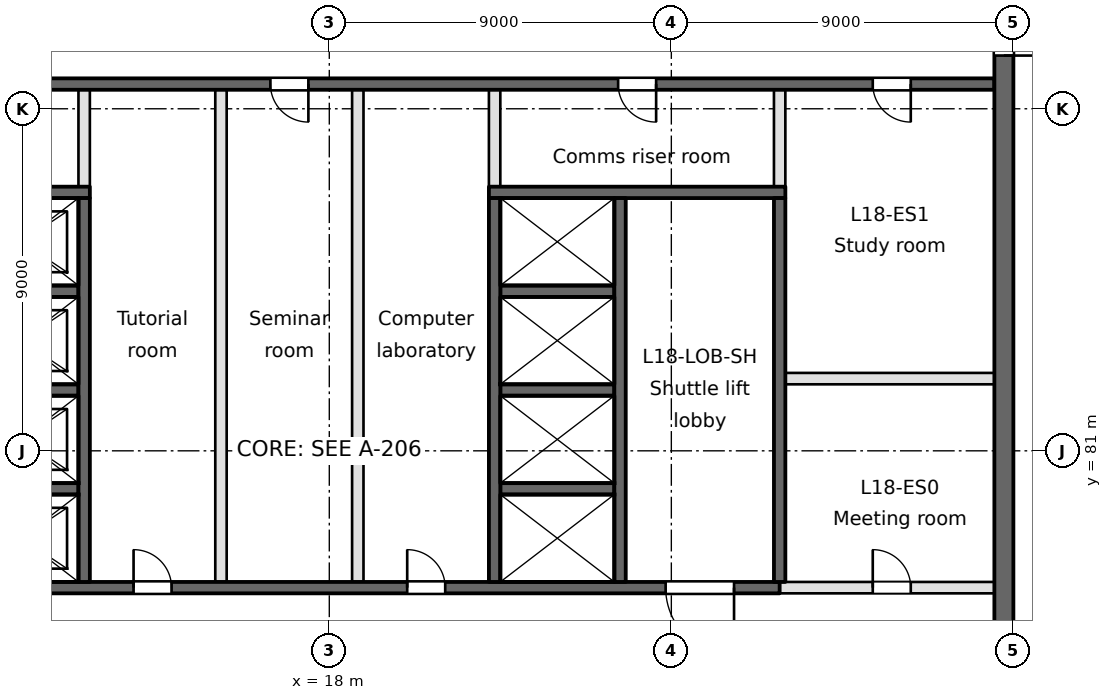
"""IFC4 building model, lengths in metres.
Left out: names, types, materials, properties, quantities, classifications, styles, units other than length and angle.
Written with IfcOpenShell. Run it as: python <this file> out.ifc"""

import sys

from ifc_helpers import new_model, si_unit, direction, frame, frame_2d, origin, place, context, subcontext, project, spatial, rectangle, extrude, element, fill, save


model = new_model("IFC4")
c1 = context("Model", 3, precision=1e-05, world=origin(), true_north=direction((0.0, 1.0)))
c2 = subcontext(c1, "Body", "Model", "MODEL_VIEW")
j1 = project(units=[si_unit("LENGTHUNIT", "METRE"), si_unit("PLANEANGLEUNIT", "RADIAN")], contexts=[c1])
p1 = place(None, origin())
s1 = spatial("IfcSite", under=j1, at=p1, CompositionType="ELEMENT")
p2 = place(p1, origin())
s2 = spatial("IfcBuilding", under=s1, at=p2, CompositionType="ELEMENT")
p3 = place(p2, frame((0.0, 0.0, 76.5)))
s3 = spatial("IfcBuildingStorey", under=s2, at=p3, CompositionType="ELEMENT", Elevation=76.5)
p4 = place(p3, frame((0.9, 77.4, -0.4), z_axis=(0.0, 0.0, 1.0), x_axis=(1.0, 0.0, 0.0)))
e1 = element("IfcWall", 1, at=p4, inside=s3, PredefinedType="SOLIDWALL", context=c2, shape_type="SweptSolid", body=[
    extrude(rectangle(XDim=28.95, YDim=0.3, at=frame_2d((14.475, 0.0))), origin(), (0.0, 0.0, 1.0), 3.65),
])
p5 = place(p4, frame((4.35, 0.0, 0.4)))
e2 = element("IfcOpeningElement", 2, at=p5, cuts=e1, PredefinedType="OPENING", context=c2, shape_type="SweptSolid", body=[
    extrude(rectangle(XDim=1.8, YDim=2.1, at=frame_2d((0.9, 1.05))), frame((0.0, 0.15, 0.0), z_axis=(0.0, -1.0, 0.0), x_axis=(1.0, 0.0, 0.0)), (0.0, 0.0, 1.0), 0.3),
])
p6 = place(p4, frame((25.95, 0.0, 0.4)))
e3 = element("IfcOpeningElement", 3, at=p6, cuts=e1, PredefinedType="OPENING", context=c2, shape_type="SweptSolid", body=[
    extrude(rectangle(XDim=1.8, YDim=2.1, at=frame_2d((0.9, 1.05))), frame((0.0, 0.15, 0.0), z_axis=(0.0, -1.0, 0.0), x_axis=(1.0, 0.0, 0.0)), (0.0, 0.0, 1.0), 0.3),
])
p7 = place(p4, frame((11.95, 0.0, 0.4)))
e4 = element("IfcOpeningElement", 4, at=p7, cuts=e1, PredefinedType="OPENING", context=c2, shape_type="SweptSolid", body=[
    extrude(rectangle(XDim=1.0, YDim=2.1, at=frame_2d((0.5, 1.05))), frame((0.0, 0.15, 0.0), z_axis=(0.0, -1.0, 0.0), x_axis=(1.0, 0.0, 0.0)), (0.0, 0.0, 1.0), 0.3),
])
p8 = place(p4, frame((19.15, 0.0, 0.4)))
e5 = element("IfcOpeningElement", 5, at=p8, cuts=e1, PredefinedType="OPENING", context=c2, shape_type="SweptSolid", body=[
    extrude(rectangle(XDim=1.0, YDim=2.1, at=frame_2d((0.5, 1.05))), frame((0.0, 0.15, 0.0), z_axis=(0.0, -1.0, 0.0), x_axis=(1.0, 0.0, 0.0)), (0.0, 0.0, 1.0), 0.3),
])
p9 = place(p3, frame((29.85, 77.4, 0.0), z_axis=(0.0, 0.0, 1.0), x_axis=(1.0, 0.0, 0.0)))
e6 = element("IfcWall", 6, at=p9, inside=s3, PredefinedType="PARTITIONING", context=c2, shape_type="SweptSolid", body=[
    extrude(rectangle(XDim=5.65, YDim=0.3, at=frame_2d((2.825, 0.0))), origin(), (0.0, 0.0, 1.0), 3.25),
])
p10 = place(p9, frame((2.45, 0.0, 0.0)))
e7 = element("IfcOpeningElement", 7, at=p10, cuts=e6, PredefinedType="OPENING", context=c2, shape_type="SweptSolid", body=[
    extrude(rectangle(XDim=1.0, YDim=2.1, at=frame_2d((0.5, 1.05))), frame((0.0, 0.15, 0.0), z_axis=(0.0, -1.0, 0.0), x_axis=(1.0, 0.0, 0.0)), (0.0, 0.0, 1.0), 0.3),
])
for number, where, z_axis, x_axis in (
    (8, (8.4, 80.0, -0.4), (0.0, 0.0, 1.0), (1.0, 0.0, 0.0)),
    (9, (22.5, 80.0, -0.4), (0.0, 0.0, 1.0), (1.0, 0.0, 0.0)),
    (10, (8.4, 82.6, -0.4), (0.0, 0.0, 1.0), (1.0, 0.0, 0.0)),
    (11, (22.5, 82.6, -0.4), (0.0, 0.0, 1.0), (1.0, 0.0, 0.0)),
):
    element("IfcWall", number, at=place(p3, frame(where, z_axis=z_axis, x_axis=x_axis)), inside=s3, PredefinedType="SOLIDWALL", context=c2, shape_type="SweptSolid", body=[
        extrude(rectangle(XDim=3.0, YDim=0.3, at=frame_2d((1.5, 0.0))), origin(), (0.0, 0.0, 1.0), 3.65),
    ])
p11 = place(p3, frame((30.0, 82.9, 0.0), z_axis=(0.0, 0.0, 1.0), x_axis=(1.0, 0.0, 0.0)))
e12 = element("IfcWall", 12, at=p11, inside=s3, PredefinedType="PARTITIONING", context=c2, shape_type="SweptSolid", body=[
    extrude(rectangle(XDim=5.5, YDim=0.3, at=frame_2d((2.75, 0.0))), origin(), (0.0, 0.0, 1.0), 3.25),
])
for number, where, z_axis, x_axis in (
    (13, (8.4, 85.2, -0.4), (0.0, 0.0, 1.0), (1.0, 0.0, 0.0)),
    (14, (22.5, 85.2, -0.4), (0.0, 0.0, 1.0), (1.0, 0.0, 0.0)),
):
    element("IfcWall", number, at=place(p3, frame(where, z_axis=z_axis, x_axis=x_axis)), inside=s3, PredefinedType="SOLIDWALL", context=c2, shape_type="SweptSolid", body=[
        extrude(rectangle(XDim=3.0, YDim=0.3, at=frame_2d((1.5, 0.0))), origin(), (0.0, 0.0, 1.0), 3.65),
    ])
p12 = place(p3, frame((0.9, 87.8, -0.4), z_axis=(0.0, 0.0, 1.0), x_axis=(1.0, 0.0, 0.0)))
e15 = element("IfcWall", 15, at=p12, inside=s3, PredefinedType="SOLIDWALL", context=c2, shape_type="SweptSolid", body=[
    extrude(rectangle(XDim=10.8, YDim=0.3, at=frame_2d((5.4, 0.0))), origin(), (0.0, 0.0, 1.0), 3.65),
])
p13 = place(p3, frame((22.2, 87.8, -0.4), z_axis=(0.0, 0.0, 1.0), x_axis=(1.0, 0.0, 0.0)))
e16 = element("IfcWall", 16, at=p13, inside=s3, PredefinedType="SOLIDWALL", context=c2, shape_type="SweptSolid", body=[
    extrude(rectangle(XDim=7.8, YDim=0.3, at=frame_2d((3.9, 0.0))), origin(), (0.0, 0.0, 1.0), 3.65),
])
p14 = place(p3, frame((0.9, 90.65, -0.4), z_axis=(0.0, 0.0, 1.0), x_axis=(1.0, 0.0, 0.0)))
e17 = element("IfcWall", 17, at=p14, inside=s3, PredefinedType="SOLIDWALL", context=c2, shape_type="SweptSolid", body=[
    extrude(rectangle(XDim=34.6, YDim=0.3, at=frame_2d((17.3, 0.0))), origin(), (0.0, 0.0, 1.0), 3.65),
])
p15 = place(p14, frame((4.75, 0.0, 0.4)))
e18 = element("IfcOpeningElement", 18, at=p15, cuts=e17, PredefinedType="OPENING", context=c2, shape_type="SweptSolid", body=[
    extrude(rectangle(XDim=1.0, YDim=2.1, at=frame_2d((0.5, 1.05))), frame((0.0, 0.15, 0.0), z_axis=(0.0, -1.0, 0.0), x_axis=(1.0, 0.0, 0.0)), (0.0, 0.0, 1.0), 0.3),
])
p16 = place(p14, frame((24.7, 0.0, 0.4)))
e19 = element("IfcOpeningElement", 19, at=p16, cuts=e17, PredefinedType="OPENING", context=c2, shape_type="SweptSolid", body=[
    extrude(rectangle(XDim=1.0, YDim=2.1, at=frame_2d((0.5, 1.05))), frame((0.0, 0.15, 0.0), z_axis=(0.0, -1.0, 0.0), x_axis=(1.0, 0.0, 0.0)), (0.0, 0.0, 1.0), 0.3),
])
p17 = place(p14, frame((15.55, 0.0, 0.4)))
e20 = element("IfcOpeningElement", 20, at=p17, cuts=e17, PredefinedType="OPENING", context=c2, shape_type="SweptSolid", body=[
    extrude(rectangle(XDim=1.0, YDim=2.1, at=frame_2d((0.5, 1.05))), frame((0.0, 0.15, 0.0), z_axis=(0.0, -1.0, 0.0), x_axis=(1.0, 0.0, 0.0)), (0.0, 0.0, 1.0), 0.3),
])
p18 = place(p14, frame((31.4, 0.0, 0.4)))
e21 = element("IfcOpeningElement", 21, at=p18, cuts=e17, PredefinedType="OPENING", context=c2, shape_type="SweptSolid", body=[
    extrude(rectangle(XDim=1.0, YDim=2.1, at=frame_2d((0.5, 1.05))), frame((0.0, 0.15, 0.0), z_axis=(0.0, -1.0, 0.0), x_axis=(1.0, 0.0, 0.0)), (0.0, 0.0, 1.0), 0.3),
])
p19 = place(p3, frame((11.55, 77.55, -0.4), z_axis=(0.0, 0.0, 1.0), x_axis=(0.0, 1.0, 0.0)))
e22 = element("IfcWall", 22, at=p19, inside=s3, PredefinedType="SOLIDWALL", context=c2, shape_type="SweptSolid", body=[
    extrude(rectangle(XDim=10.1, YDim=0.3, at=frame_2d((5.05, 0.0))), origin(), (0.0, 0.0, 1.0), 3.65),
])
p20 = place(p3, frame((11.55, 87.95, 0.0), z_axis=(0.0, 0.0, 1.0), x_axis=(0.0, 1.0, 0.0)))
e23 = element("IfcWall", 23, at=p20, inside=s3, PredefinedType="PARTITIONING", context=c2, shape_type="SweptSolid", body=[
    extrude(rectangle(XDim=2.55, YDim=0.3, at=frame_2d((1.275, 0.0))), origin(), (0.0, 0.0, 1.0), 3.25),
])
for number, where, z_axis, x_axis in (
    (24, (15.15, 77.55, 0.0), (0.0, 0.0, 1.0), (0.0, 1.0, 0.0)),
    (25, (18.75, 77.55, 0.0), (0.0, 0.0, 1.0), (0.0, 1.0, 0.0)),
):
    element("IfcWall", number, at=place(p3, frame(where, z_axis=z_axis, x_axis=x_axis)), inside=s3, PredefinedType="PARTITIONING", context=c2, shape_type="SweptSolid", body=[
        extrude(rectangle(XDim=12.95, YDim=0.3, at=frame_2d((6.475, 0.0))), origin(), (0.0, 0.0, 1.0), 3.25),
    ])
p21 = place(p3, frame((22.35, 77.55, -0.4), z_axis=(0.0, 0.0, 1.0), x_axis=(0.0, 1.0, 0.0)))
e26 = element("IfcWall", 26, at=p21, inside=s3, PredefinedType="SOLIDWALL", context=c2, shape_type="SweptSolid", body=[
    extrude(rectangle(XDim=10.1, YDim=0.3, at=frame_2d((5.05, 0.0))), origin(), (0.0, 0.0, 1.0), 3.65),
])
p22 = place(p3, frame((22.35, 87.95, 0.0), z_axis=(0.0, 0.0, 1.0), x_axis=(0.0, 1.0, 0.0)))
e27 = element("IfcWall", 27, at=p22, inside=s3, PredefinedType="PARTITIONING", context=c2, shape_type="SweptSolid", body=[
    extrude(rectangle(XDim=2.55, YDim=0.3, at=frame_2d((1.275, 0.0))), origin(), (0.0, 0.0, 1.0), 3.25),
])
for number, where, z_axis, x_axis in (
    (28, (25.65, 77.55, -0.4), (0.0, 0.0, 1.0), (0.0, 1.0, 0.0)),
    (29, (29.85, 77.55, -0.4), (0.0, 0.0, 1.0), (0.0, 1.0, 0.0)),
):
    element("IfcWall", number, at=place(p3, frame(where, z_axis=z_axis, x_axis=x_axis)), inside=s3, PredefinedType="SOLIDWALL", context=c2, shape_type="SweptSolid", body=[
        extrude(rectangle(XDim=10.1, YDim=0.3, at=frame_2d((5.05, 0.0))), origin(), (0.0, 0.0, 1.0), 3.65),
    ])
p23 = place(p3, frame((29.85, 87.95, 0.0), z_axis=(0.0, 0.0, 1.0), x_axis=(0.0, 1.0, 0.0)))
e30 = element("IfcWall", 30, at=p23, inside=s3, PredefinedType="PARTITIONING", context=c2, shape_type="SweptSolid", body=[
    extrude(rectangle(XDim=2.55, YDim=0.3, at=frame_2d((1.275, 0.0))), origin(), (0.0, 0.0, 1.0), 3.25),
])
p24 = place(p3, frame((35.75, 63.5, -0.4), z_axis=(0.0, 0.0, 1.0), x_axis=(0.0, 1.0, 0.0)))
e31 = element("IfcWall", 31, at=p24, inside=s3, PredefinedType="SOLIDWALL", context=c2, shape_type="SweptSolid", body=[
    extrude(rectangle(XDim=34.6, YDim=0.5, at=frame_2d((17.3, 0.0))), origin(), (0.0, 0.0, 1.0), 3.65),
])
p25 = place(p24, frame((9.7, 0.0, 0.4)))
e32 = element("IfcOpeningElement", 32, at=p25, cuts=e31, PredefinedType="OPENING", context=c2, shape_type="SweptSolid", body=[
    extrude(rectangle(XDim=2.4, YDim=2.1, at=frame_2d((1.2, 1.05))), frame((0.0, 0.25, 0.0), z_axis=(0.0, -1.0, 0.0), x_axis=(1.0, 0.0, 0.0)), (0.0, 0.0, 1.0), 0.5),
])
p26 = place(p24, frame((27.9, 0.0, 0.4)))
e33 = element("IfcOpeningElement", 33, at=p26, cuts=e31, PredefinedType="OPENING", context=c2, shape_type="SweptSolid", body=[
    extrude(rectangle(XDim=1.5, YDim=2.1, at=frame_2d((0.75, 1.05))), frame((0.0, 0.25, 0.0), z_axis=(0.0, -1.0, 0.0), x_axis=(1.0, 0.0, 0.0)), (0.0, 0.0, 1.0), 0.5),
])
p27 = place(p24, frame((1.5, 0.0, 0.4)))
e34 = element("IfcOpeningElement", 34, at=p27, cuts=e31, PredefinedType="OPENING", context=c2, shape_type="SweptSolid", body=[
    extrude(rectangle(XDim=1.2, YDim=2.1, at=frame_2d((0.6, 1.05))), frame((0.0, 0.25, 0.0), z_axis=(0.0, -1.0, 0.0), x_axis=(1.0, 0.0, 0.0)), (0.0, 0.0, 1.0), 0.5),
])
p28 = place(p6, frame((1.8, 0.0, 0.0), z_axis=(0.0, 0.0, 1.0), x_axis=(-1.0, 0.0, 0.0)))
e35 = element("IfcDoor", 35, at=p28, inside=s3, OperationType="SINGLE_SWING_LEFT", PredefinedType="DOOR", context=c2, shape_type="SweptSolid", body=[
    extrude(rectangle(XDim=1.8, YDim=2.1, at=frame_2d((0.9, 1.05))), frame((0.0, 0.025, 0.0), z_axis=(0.0, -1.0, 0.0), x_axis=(1.0, 0.0, 0.0)), (0.0, 0.0, 1.0), 0.05),
])
fill(e3, e35)
p29 = place(p26, frame((1.5, 0.0, 0.0), z_axis=(0.0, 0.0, 1.0), x_axis=(-1.0, 0.0, 0.0)))
e36 = element("IfcDoor", 36, at=p29, inside=s3, OperationType="SINGLE_SWING_RIGHT", PredefinedType="DOOR", context=c2, shape_type="SweptSolid", body=[
    extrude(rectangle(XDim=1.5, YDim=2.1, at=frame_2d((0.75, 1.05))), frame((0.0, 0.025, 0.0), z_axis=(0.0, -1.0, 0.0), x_axis=(1.0, 0.0, 0.0)), (0.0, 0.0, 1.0), 0.05),
])
fill(e33, e36)
p30 = place(p16, frame((1.0, 0.0, 0.0), z_axis=(0.0, 0.0, 1.0), x_axis=(-1.0, 0.0, 0.0)))
e37 = element("IfcDoor", 37, at=p30, inside=s3, OperationType="SINGLE_SWING_LEFT", PredefinedType="DOOR", context=c2, shape_type="SweptSolid", body=[
    extrude(rectangle(XDim=1.0, YDim=2.1, at=frame_2d((0.5, 1.05))), frame((0.0, 0.025, 0.0), z_axis=(0.0, -1.0, 0.0), x_axis=(1.0, 0.0, 0.0)), (0.0, 0.0, 1.0), 0.05),
])
fill(e19, e37)
p31 = place(p7, origin())
e38 = element("IfcDoor", 38, at=p31, inside=s3, OperationType="SINGLE_SWING_LEFT", PredefinedType="DOOR", context=c2, shape_type="SweptSolid", body=[
    extrude(rectangle(XDim=1.0, YDim=2.1, at=frame_2d((0.5, 1.05))), frame((0.0, 0.025, 0.0), z_axis=(0.0, -1.0, 0.0), x_axis=(1.0, 0.0, 0.0)), (0.0, 0.0, 1.0), 0.05),
])
fill(e4, e38)
p32 = place(p17, frame((1.0, 0.0, 0.0), z_axis=(0.0, 0.0, 1.0), x_axis=(-1.0, 0.0, 0.0)))
e39 = element("IfcDoor", 39, at=p32, inside=s3, OperationType="SINGLE_SWING_LEFT", PredefinedType="DOOR", context=c2, shape_type="SweptSolid", body=[
    extrude(rectangle(XDim=1.0, YDim=2.1, at=frame_2d((0.5, 1.05))), frame((0.0, 0.025, 0.0), z_axis=(0.0, -1.0, 0.0), x_axis=(1.0, 0.0, 0.0)), (0.0, 0.0, 1.0), 0.05),
])
fill(e20, e39)
p33 = place(p8, origin())
e40 = element("IfcDoor", 40, at=p33, inside=s3, OperationType="SINGLE_SWING_LEFT", PredefinedType="DOOR", context=c2, shape_type="SweptSolid", body=[
    extrude(rectangle(XDim=1.0, YDim=2.1, at=frame_2d((0.5, 1.05))), frame((0.0, 0.025, 0.0), z_axis=(0.0, -1.0, 0.0), x_axis=(1.0, 0.0, 0.0)), (0.0, 0.0, 1.0), 0.05),
])
fill(e5, e40)
p34 = place(p10, origin())
e41 = element("IfcDoor", 41, at=p34, inside=s3, OperationType="SINGLE_SWING_LEFT", PredefinedType="DOOR", context=c2, shape_type="SweptSolid", body=[
    extrude(rectangle(XDim=1.0, YDim=2.1, at=frame_2d((0.5, 1.05))), frame((0.0, 0.025, 0.0), z_axis=(0.0, -1.0, 0.0), x_axis=(1.0, 0.0, 0.0)), (0.0, 0.0, 1.0), 0.05),
])
fill(e7, e41)
p35 = place(p18, frame((1.0, 0.0, 0.0), z_axis=(0.0, 0.0, 1.0), x_axis=(-1.0, 0.0, 0.0)))
e42 = element("IfcDoor", 42, at=p35, inside=s3, OperationType="SINGLE_SWING_LEFT", PredefinedType="DOOR", context=c2, shape_type="SweptSolid", body=[
    extrude(rectangle(XDim=1.0, YDim=2.1, at=frame_2d((0.5, 1.05))), frame((0.0, 0.025, 0.0), z_axis=(0.0, -1.0, 0.0), x_axis=(1.0, 0.0, 0.0)), (0.0, 0.0, 1.0), 0.05),
])
fill(e21, e42)
save(model, sys.argv[1])
